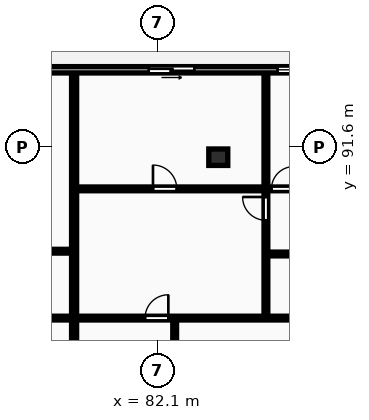
"""IFC4 building model, lengths in metres.
Left out: names, types, materials, properties, quantities, classifications, styles, units other than length and angle.
Written with IfcOpenShell. Run it as: python <this file> out.ifc"""

import sys

from ifc_helpers import new_model, si_unit, direction, frame, frame_2d, origin, origin_2d, place, context, subcontext, project, spatial, rectangle, extrude, element, fill, save


model = new_model("IFC4")
c1 = context("Model", 3, precision=1e-05, world=origin(), true_north=direction((0.0, 1.0)))
c2 = subcontext(c1, "Body", "Model", "MODEL_VIEW")
j1 = project(units=[si_unit("LENGTHUNIT", "METRE"), si_unit("PLANEANGLEUNIT", "RADIAN")], contexts=[c1])
p1 = place(None, origin())
s1 = spatial("IfcSite", under=j1, at=p1, CompositionType="ELEMENT")
p2 = place(p1, origin())
s2 = spatial("IfcBuilding", under=s1, at=p2, CompositionType="ELEMENT")
p3 = place(p2, frame((0.0, 0.0, 249.35)))
s3 = spatial("IfcBuildingStorey", under=s2, at=p3, CompositionType="ELEMENT", Elevation=249.35)
p4 = place(p3, frame((84.5, 91.2, 0.0), z_axis=(0.0, 0.0, 1.0), x_axis=(1.0, 0.0, 0.0)))
e1 = element("IfcColumn", 1, at=p4, inside=s3, PredefinedType="COLUMN", context=c2, shape_type="SweptSolid", body=[
    extrude(rectangle(XDim=0.75, YDim=0.65, at=origin_2d()), origin(), (0.0, 0.0, 1.0), 3.45),
])
p5 = place(p3, frame((128.4, 94.65, 0.0), z_axis=(0.0, 0.0, 1.0), x_axis=(-1.0, 0.0, 0.0)))
e2 = element("IfcWall", 2, at=p5, inside=s3, PredefinedType="STANDARD", context=c2, shape_type="SweptSolid", body=[
    extrude(rectangle(XDim=68.6, YDim=0.25, at=frame_2d((34.3, 0.0))), origin(), (0.0, 0.0, 1.0), 3.17),
])
p6 = place(p5, frame((60.518, 0.0, 0.85)))
e3 = element("IfcOpeningElement", 3, at=p6, cuts=e2, PredefinedType="OPENING", context=c2, shape_type="SweptSolid", body=[
    extrude(rectangle(XDim=2.4, YDim=1.9, at=frame_2d((1.2, 0.95))), frame((0.0, 0.135, 0.0), z_axis=(0.0, -1.0, 0.0), x_axis=(1.0, 0.0, 0.0)), (0.0, 0.0, 1.0), 0.27),
])
p7 = place(p5, frame((55.492, 0.0, 0.85)))
e4 = element("IfcOpeningElement", 4, at=p7, cuts=e2, PredefinedType="OPENING", context=c2, shape_type="SweptSolid", body=[
    extrude(rectangle(XDim=2.4, YDim=1.9, at=frame_2d((1.2, 0.95))), frame((0.0, 0.135, 0.0), z_axis=(0.0, -1.0, 0.0), x_axis=(1.0, 0.0, 0.0)), (0.0, 0.0, 1.0), 0.27),
])
p8 = place(p5, frame((65.455, 0.0, 0.0)))
e5 = element("IfcOpeningElement", 5, at=p8, cuts=e2, PredefinedType="OPENING", context=c2, shape_type="SweptSolid", body=[
    extrude(rectangle(XDim=1.8, YDim=2.2, at=frame_2d((0.9, 1.1))), frame((0.0, 0.135, 0.0), z_axis=(0.0, -1.0, 0.0), x_axis=(1.0, 0.0, 0.0)), (0.0, 0.0, 1.0), 0.27),
])
p9 = place(p5, frame((50.746, 0.0, 0.85)))
e6 = element("IfcOpeningElement", 6, at=p9, cuts=e2, PredefinedType="OPENING", context=c2, shape_type="SweptSolid", body=[
    extrude(rectangle(XDim=2.4, YDim=1.9, at=frame_2d((1.2, 0.95))), frame((0.0, 0.135, 0.0), z_axis=(0.0, -1.0, 0.0), x_axis=(1.0, 0.0, 0.0)), (0.0, 0.0, 1.0), 0.27),
])
p10 = place(p5, frame((39.76, 0.0, 0.85)))
e7 = element("IfcOpeningElement", 7, at=p10, cuts=e2, PredefinedType="OPENING", context=c2, shape_type="SweptSolid", body=[
    extrude(rectangle(XDim=1.8, YDim=1.8, at=frame_2d((0.9, 0.9))), frame((0.0, 0.135, 0.0), z_axis=(0.0, -1.0, 0.0), x_axis=(1.0, 0.0, 0.0)), (0.0, 0.0, 1.0), 0.27),
])
p11 = place(p5, frame((37.04, 0.0, 0.85)))
e8 = element("IfcOpeningElement", 8, at=p11, cuts=e2, PredefinedType="OPENING", context=c2, shape_type="SweptSolid", body=[
    extrude(rectangle(XDim=1.8, YDim=1.8, at=frame_2d((0.9, 0.9))), frame((0.0, 0.135, 0.0), z_axis=(0.0, -1.0, 0.0), x_axis=(1.0, 0.0, 0.0)), (0.0, 0.0, 1.0), 0.27),
])
p12 = place(p5, frame((44.845, 0.0, 0.0)))
e9 = element("IfcOpeningElement", 9, at=p12, cuts=e2, PredefinedType="OPENING", context=c2, shape_type="SweptSolid", body=[
    extrude(rectangle(XDim=1.8, YDim=2.2, at=frame_2d((0.9, 1.1))), frame((0.0, 0.135, 0.0), z_axis=(0.0, -1.0, 0.0), x_axis=(1.0, 0.0, 0.0)), (0.0, 0.0, 1.0), 0.27),
])
p13 = place(p5, frame((33.056, 0.0, 0.85)))
e10 = element("IfcOpeningElement", 10, at=p13, cuts=e2, PredefinedType="OPENING", context=c2, shape_type="SweptSolid", body=[
    extrude(rectangle(XDim=2.4, YDim=1.9, at=frame_2d((1.2, 0.95))), frame((0.0, 0.135, 0.0), z_axis=(0.0, -1.0, 0.0), x_axis=(1.0, 0.0, 0.0)), (0.0, 0.0, 1.0), 0.27),
])
p14 = place(p5, frame((27.394, 0.0, 0.0)))
e11 = element("IfcOpeningElement", 11, at=p14, cuts=e2, PredefinedType="OPENING", context=c2, shape_type="SweptSolid", body=[
    extrude(rectangle(XDim=1.8, YDim=2.2, at=frame_2d((0.9, 1.1))), frame((0.0, 0.135, 0.0), z_axis=(0.0, -1.0, 0.0), x_axis=(1.0, 0.0, 0.0)), (0.0, 0.0, 1.0), 0.27),
])
p15 = place(p5, frame((18.879, 0.0, 0.85)))
e12 = element("IfcOpeningElement", 12, at=p15, cuts=e2, PredefinedType="OPENING", context=c2, shape_type="SweptSolid", body=[
    extrude(rectangle(XDim=2.4, YDim=1.9, at=frame_2d((1.2, 0.95))), frame((0.0, 0.135, 0.0), z_axis=(0.0, -1.0, 0.0), x_axis=(1.0, 0.0, 0.0)), (0.0, 0.0, 1.0), 0.27),
])
p16 = place(p5, frame((11.048, 0.0, 0.0)))
e13 = element("IfcOpeningElement", 13, at=p16, cuts=e2, PredefinedType="OPENING", context=c2, shape_type="SweptSolid", body=[
    extrude(rectangle(XDim=1.8, YDim=2.2, at=frame_2d((0.9, 1.1))), frame((0.0, 0.135, 0.0), z_axis=(0.0, -1.0, 0.0), x_axis=(1.0, 0.0, 0.0)), (0.0, 0.0, 1.0), 0.27),
])
p17 = place(p5, frame((3.298, 0.0, 0.85)))
e14 = element("IfcOpeningElement", 14, at=p17, cuts=e2, PredefinedType="OPENING", context=c2, shape_type="SweptSolid", body=[
    extrude(rectangle(XDim=2.4, YDim=1.9, at=frame_2d((1.2, 0.95))), frame((0.0, 0.135, 0.0), z_axis=(0.0, -1.0, 0.0), x_axis=(1.0, 0.0, 0.0)), (0.0, 0.0, 1.0), 0.27),
])
p18 = place(p3, frame((78.809, 70.18, 0.0), z_axis=(0.0, 0.0, 1.0), x_axis=(0.0, 1.0, 0.0)))
e15 = element("IfcWall", 15, at=p18, inside=s3, PredefinedType="PARTITIONING", context=c2, shape_type="SweptSolid", body=[
    extrude(rectangle(XDim=24.32, YDim=0.2, at=frame_2d((12.16, 0.0))), origin(), (0.0, 0.0, 1.0), 3.17),
])
p19 = place(p3, frame((64.21, 87.49, 0.0), z_axis=(0.0, 0.0, 1.0), x_axis=(1.0, 0.0, 0.0)))
e16 = element("IfcWall", 16, at=p19, inside=s3, PredefinedType="PARTITIONING", context=c2, shape_type="SweptSolid", body=[
    extrude(rectangle(XDim=14.519, YDim=0.15, at=frame_2d((7.26, 0.0))), origin(), (0.0, 0.0, 1.0), 3.17),
])
p20 = place(p19, frame((1.21, 0.0, 0.0)))
e17 = element("IfcOpeningElement", 17, at=p20, cuts=e16, PredefinedType="OPENING", context=c2, shape_type="SweptSolid", body=[
    extrude(rectangle(XDim=0.84, YDim=2.04, at=frame_2d((0.42, 1.02))), frame((0.0, 0.085, 0.0), z_axis=(0.0, -1.0, 0.0), x_axis=(1.0, 0.0, 0.0)), (0.0, 0.0, 1.0), 0.17),
])
p21 = place(p19, frame((6.84, 0.0, 0.0)))
e18 = element("IfcOpeningElement", 18, at=p21, cuts=e16, PredefinedType="OPENING", context=c2, shape_type="SweptSolid", body=[
    extrude(rectangle(XDim=0.84, YDim=2.04, at=frame_2d((0.42, 1.02))), frame((0.0, 0.085, 0.0), z_axis=(0.0, -1.0, 0.0), x_axis=(1.0, 0.0, 0.0)), (0.0, 0.0, 1.0), 0.17),
])
p22 = place(p19, frame((10.26, 0.0, 0.0)))
e19 = element("IfcOpeningElement", 19, at=p22, cuts=e16, PredefinedType="OPENING", context=c2, shape_type="SweptSolid", body=[
    extrude(rectangle(XDim=0.84, YDim=2.04, at=frame_2d((0.42, 1.02))), frame((0.0, 0.085, 0.0), z_axis=(0.0, -1.0, 0.0), x_axis=(1.0, 0.0, 0.0)), (0.0, 0.0, 1.0), 0.17),
])
p23 = place(p3, frame((59.88, 84.85, 0.0), z_axis=(0.0, 0.0, 1.0), x_axis=(1.0, 0.0, 0.0)))
e20 = element("IfcWall", 20, at=p23, inside=s3, PredefinedType="PARTITIONING", context=c2, shape_type="SweptSolid", body=[
    extrude(rectangle(XDim=18.849, YDim=0.15, at=frame_2d((9.425, 0.0))), origin(), (0.0, 0.0, 1.0), 3.17),
])
p24 = place(p23, frame((2.72, 0.0, 0.0)))
e21 = element("IfcOpeningElement", 21, at=p24, cuts=e20, PredefinedType="OPENING", context=c2, shape_type="SweptSolid", body=[
    extrude(rectangle(XDim=0.92, YDim=2.08, at=frame_2d((0.46, 1.04))), frame((0.0, 0.085, 0.0), z_axis=(0.0, -1.0, 0.0), x_axis=(1.0, 0.0, 0.0)), (0.0, 0.0, 1.0), 0.17),
])
p25 = place(p3, frame((82.779, 70.16, 0.0), z_axis=(0.0, 0.0, 1.0), x_axis=(0.0, 1.0, 0.0)))
e22 = element("IfcWall", 22, at=p25, inside=s3, PredefinedType="PARTITIONING", context=c2, shape_type="SweptSolid", body=[
    extrude(rectangle(XDim=14.65, YDim=0.15, at=frame_2d((7.325, 0.0))), origin(), (0.0, 0.0, 1.0), 3.17),
])
p26 = place(p25, frame((6.375, 0.0, 0.0)))
e23 = element("IfcOpeningElement", 23, at=p26, cuts=e22, PredefinedType="OPENING", context=c2, shape_type="SweptSolid", body=[
    extrude(rectangle(XDim=0.88, YDim=2.06, at=frame_2d((0.44, 1.03))), frame((0.0, 0.085, 0.0), z_axis=(0.0, -1.0, 0.0), x_axis=(1.0, 0.0, 0.0)), (0.0, 0.0, 1.0), 0.17),
])
p27 = place(p3, frame((86.38, 84.89, 0.0), z_axis=(0.0, 0.0, 1.0), x_axis=(0.0, 1.0, 0.0)))
e24 = element("IfcWall", 24, at=p27, inside=s3, PredefinedType="PARTITIONING", context=c2, shape_type="SweptSolid", body=[
    extrude(rectangle(XDim=9.61, YDim=0.15, at=frame_2d((4.805, 0.0))), origin(), (0.0, 0.0, 1.0), 3.17),
])
p28 = place(p27, frame((3.82, 0.0, 0.0)))
e25 = element("IfcOpeningElement", 25, at=p28, cuts=e24, PredefinedType="OPENING", context=c2, shape_type="SweptSolid", body=[
    extrude(rectangle(XDim=0.92, YDim=2.08, at=frame_2d((0.46, 1.04))), frame((0.0, 0.085, 0.0), z_axis=(0.0, -1.0, 0.0), x_axis=(1.0, 0.0, 0.0)), (0.0, 0.0, 1.0), 0.17),
])
p29 = place(p3, frame((86.42, 87.38, 0.0), z_axis=(0.0, 0.0, 1.0), x_axis=(1.0, 0.0, 0.0)))
e26 = element("IfcWall", 26, at=p29, inside=s3, PredefinedType="PARTITIONING", context=c2, shape_type="SweptSolid", body=[
    extrude(rectangle(XDim=10.089, YDim=0.15, at=frame_2d((5.044, 0.0))), origin(), (0.0, 0.0, 1.0), 3.17),
])
p30 = place(p29, frame((4.31, 0.0, 0.0)))
e27 = element("IfcOpeningElement", 27, at=p30, cuts=e26, PredefinedType="OPENING", context=c2, shape_type="SweptSolid", body=[
    extrude(rectangle(XDim=0.84, YDim=2.04, at=frame_2d((0.42, 1.02))), frame((0.0, 0.085, 0.0), z_axis=(0.0, -1.0, 0.0), x_axis=(1.0, 0.0, 0.0)), (0.0, 0.0, 1.0), 0.17),
])
p31 = place(p29, frame((5.65, 0.0, 0.0)))
e28 = element("IfcOpeningElement", 28, at=p31, cuts=e26, PredefinedType="OPENING", context=c2, shape_type="SweptSolid", body=[
    extrude(rectangle(XDim=0.84, YDim=2.04, at=frame_2d((0.42, 1.02))), frame((0.0, 0.085, 0.0), z_axis=(0.0, -1.0, 0.0), x_axis=(1.0, 0.0, 0.0)), (0.0, 0.0, 1.0), 0.17),
])
p32 = place(p3, frame((78.889, 84.85, 0.0), z_axis=(0.0, 0.0, 1.0), x_axis=(1.0, 0.0, 0.0)))
e29 = element("IfcWall", 29, at=p32, inside=s3, PredefinedType="PARTITIONING", context=c2, shape_type="SweptSolid", body=[
    extrude(rectangle(XDim=17.619, YDim=0.15, at=frame_2d((8.81, 0.0))), origin(), (0.0, 0.0, 1.0), 3.17),
])
p33 = place(p32, frame((2.72, 0.0, 0.0)))
e30 = element("IfcOpeningElement", 30, at=p33, cuts=e29, PredefinedType="OPENING", context=c2, shape_type="SweptSolid", body=[
    extrude(rectangle(XDim=0.92, YDim=2.08, at=frame_2d((0.46, 1.04))), frame((0.0, 0.085, 0.0), z_axis=(0.0, -1.0, 0.0), x_axis=(1.0, 0.0, 0.0)), (0.0, 0.0, 1.0), 0.17),
])
p34 = place(p3, frame((78.889, 89.95, 0.0), z_axis=(0.0, 0.0, 1.0), x_axis=(1.0, 0.0, 0.0)))
e31 = element("IfcWall", 31, at=p34, inside=s3, PredefinedType="PARTITIONING", context=c2, shape_type="SweptSolid", body=[
    extrude(rectangle(XDim=12.931, YDim=0.15, at=frame_2d((6.465, 0.0))), origin(), (0.0, 0.0, 1.0), 3.17),
])
p35 = place(p34, frame((3.033, 0.0, 0.0)))
e32 = element("IfcOpeningElement", 32, at=p35, cuts=e31, PredefinedType="OPENING", context=c2, shape_type="SweptSolid", body=[
    extrude(rectangle(XDim=0.94, YDim=2.1, at=frame_2d((0.47, 1.05))), frame((0.0, 0.085, 0.0), z_axis=(0.0, -1.0, 0.0), x_axis=(1.0, 0.0, 0.0)), (0.0, 0.0, 1.0), 0.17),
])
p36 = place(p34, frame((7.711, 0.0, 0.0)))
e33 = element("IfcOpeningElement", 33, at=p36, cuts=e31, PredefinedType="OPENING", context=c2, shape_type="SweptSolid", body=[
    extrude(rectangle(XDim=0.88, YDim=2.06, at=frame_2d((0.44, 1.03))), frame((0.0, 0.085, 0.0), z_axis=(0.0, -1.0, 0.0), x_axis=(1.0, 0.0, 0.0)), (0.0, 0.0, 1.0), 0.17),
])
p37 = place(p34, frame((10.431, 0.0, 0.0)))
e34 = element("IfcOpeningElement", 34, at=p37, cuts=e31, PredefinedType="OPENING", context=c2, shape_type="SweptSolid", body=[
    extrude(rectangle(XDim=0.88, YDim=2.06, at=frame_2d((0.44, 1.03))), frame((0.0, 0.085, 0.0), z_axis=(0.0, -1.0, 0.0), x_axis=(1.0, 0.0, 0.0)), (0.0, 0.0, 1.0), 0.17),
])
p38 = place(p10, origin())
e35 = element("IfcWindow", 35, at=p38, inside=s3, PartitioningType="SINGLE_PANEL", PredefinedType="WINDOW", context=c2, shape_type="SweptSolid", body=[
    extrude(rectangle(XDim=1.8, YDim=1.8, at=frame_2d((0.9, 0.9))), frame((0.0, 0.03, 0.0), z_axis=(0.0, -1.0, 0.0), x_axis=(1.0, 0.0, 0.0)), (0.0, 0.0, 1.0), 0.06),
])
fill(e7, e35)
p39 = place(p12, origin())
e36 = element("IfcDoor", 36, at=p39, inside=s3, OperationType="SLIDING_TO_LEFT", PredefinedType="DOOR", context=c2, shape_type="SweptSolid", body=[
    extrude(rectangle(XDim=1.8, YDim=2.2, at=frame_2d((0.9, 1.1))), frame((0.0, 0.025, 0.0), z_axis=(0.0, -1.0, 0.0), x_axis=(1.0, 0.0, 0.0)), (0.0, 0.0, 1.0), 0.05),
])
fill(e9, e36)
p40 = place(p28, origin())
e37 = element("IfcDoor", 37, at=p40, inside=s3, OperationType="SINGLE_SWING_RIGHT", PredefinedType="DOOR", context=c2, shape_type="SweptSolid", body=[
    extrude(rectangle(XDim=0.92, YDim=2.08, at=frame_2d((0.46, 1.04))), frame((0.0, 0.025, 0.0), z_axis=(0.0, -1.0, 0.0), x_axis=(1.0, 0.0, 0.0)), (0.0, 0.0, 1.0), 0.05),
])
fill(e25, e37)
p41 = place(p33, origin())
e38 = element("IfcDoor", 38, at=p41, inside=s3, OperationType="SINGLE_SWING_RIGHT", PredefinedType="DOOR", context=c2, shape_type="SweptSolid", body=[
    extrude(rectangle(XDim=0.92, YDim=2.08, at=frame_2d((0.46, 1.04))), frame((0.0, 0.025, 0.0), z_axis=(0.0, -1.0, 0.0), x_axis=(1.0, 0.0, 0.0)), (0.0, 0.0, 1.0), 0.05),
])
fill(e30, e38)
p42 = place(p35, origin())
e39 = element("IfcDoor", 39, at=p42, inside=s3, OperationType="SINGLE_SWING_LEFT", PredefinedType="DOOR", context=c2, shape_type="SweptSolid", body=[
    extrude(rectangle(XDim=0.94, YDim=2.1, at=frame_2d((0.47, 1.05))), frame((0.0, 0.025, 0.0), z_axis=(0.0, -1.0, 0.0), x_axis=(1.0, 0.0, 0.0)), (0.0, 0.0, 1.0), 0.05),
])
fill(e32, e39)
p43 = place(p36, origin())
e40 = element("IfcDoor", 40, at=p43, inside=s3, OperationType="SINGLE_SWING_RIGHT", PredefinedType="DOOR", context=c2, shape_type="SweptSolid", body=[
    extrude(rectangle(XDim=0.88, YDim=2.06, at=frame_2d((0.44, 1.03))), frame((0.0, 0.025, 0.0), z_axis=(0.0, -1.0, 0.0), x_axis=(1.0, 0.0, 0.0)), (0.0, 0.0, 1.0), 0.05),
])
fill(e33, e40)
save(model, sys.argv[1])
